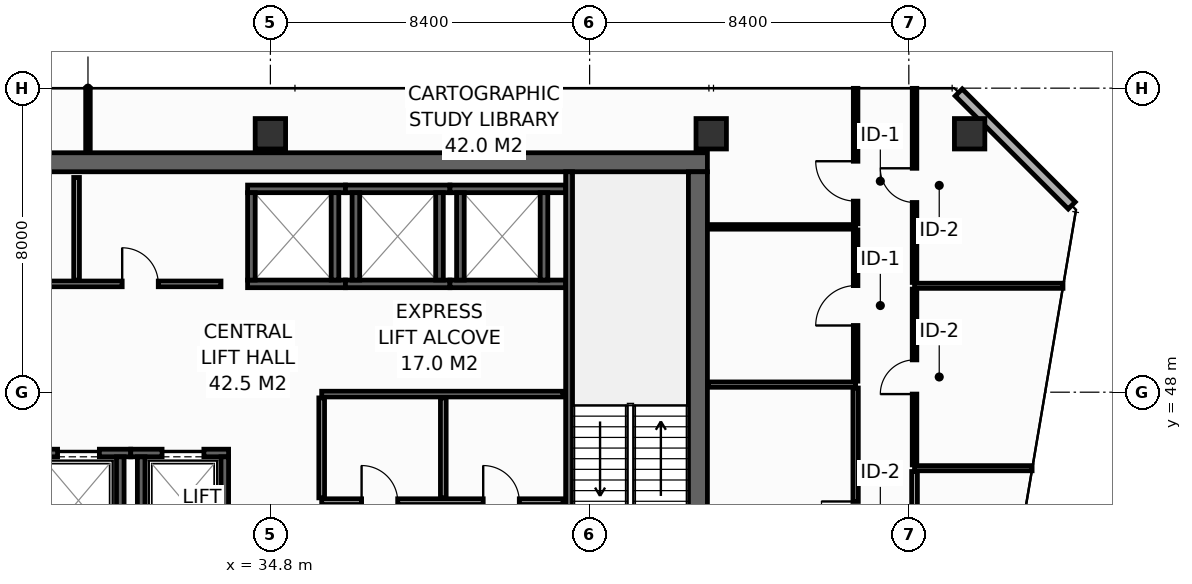
"""IFC4 building model, lengths in metres.
Left out: names, types, materials, properties, quantities, classifications, styles, units other than length and angle.
Written with IfcOpenShell. Run it as: python <this file> out.ifc"""

import sys

from ifc_helpers import new_model, si_unit, direction, frame, frame_2d, origin, origin_2d, place, context, subcontext, project, spatial, rectangle, hollow_rectangle, extrude, element, fill, save


model = new_model("IFC4")
c1 = context("Model", 3, precision=1e-05, world=origin(), true_north=direction((0.0, 1.0)))
c2 = subcontext(c1, "Body", "Model", "MODEL_VIEW")
j1 = project(units=[si_unit("LENGTHUNIT", "METRE"), si_unit("PLANEANGLEUNIT", "RADIAN")], contexts=[c1])
p1 = place(None, origin())
s1 = spatial("IfcSite", under=j1, at=p1, CompositionType="ELEMENT")
p2 = place(p1, origin())
s2 = spatial("IfcBuilding", under=s1, at=p2, CompositionType="ELEMENT")
p3 = place(p2, frame((0.0, 0.0, 198.0)))
s3 = spatial("IfcBuildingStorey", under=s2, at=p3, CompositionType="ELEMENT", Elevation=198.0)
p4 = place(p3, frame((13.6, 54.05, 0.0), z_axis=(0.0, 0.0, 1.0), x_axis=(1.0, 0.0, 0.0)))
e1 = element("IfcWall", 1, at=p4, inside=s3, PredefinedType="SHEAR", context=c2, shape_type="SweptSolid", body=[
    extrude(rectangle(XDim=32.7, YDim=0.5, at=frame_2d((16.35, 0.0))), origin(), (0.0, 0.0, 1.0), 3.55),
])
p5 = place(p3, frame((46.05, 43.4, 0.0), z_axis=(0.0, 0.0, 1.0), x_axis=(0.0, 1.0, 0.0)))
e2 = element("IfcWall", 2, at=p5, inside=s3, PredefinedType="SHEAR", context=c2, shape_type="SweptSolid", body=[
    extrude(rectangle(XDim=10.4, YDim=0.5, at=frame_2d((5.2, 0.0))), origin(), (0.0, 0.0, 1.0), 3.55),
])
for number, where, z_axis, x_axis in (
    (3, (34.8, 54.8, 0.0), (0.0, 0.0, 1.0), (1.0, 0.0, 0.0)),
    (4, (46.4, 54.8, 0.0), (0.0, 0.0, 1.0), (1.0, 0.0, 0.0)),
    (5, (53.2, 54.8, 0.0), (0.0, 0.0, 1.0), (1.0, 0.0, 0.0)),
):
    element("IfcColumn", number, at=place(p3, frame(where, z_axis=z_axis, x_axis=x_axis)), inside=s3, PredefinedType="COLUMN", context=c2, shape_type="SweptSolid", body=[
        extrude(hollow_rectangle(XDim=0.8, YDim=0.8, WallThickness=0.036, at=origin_2d()), origin(), (0.0, 0.0, 1.0), 3.8),
    ])
p6 = place(p3, frame((28.375, 46.4, 0.0), z_axis=(0.0, 0.0, 1.0), x_axis=(1.0, 0.0, 0.0)))
e6 = element("IfcWall", 6, at=p6, inside=s3, PredefinedType="SHEAR", context=c2, shape_type="SweptSolid", body=[
    extrude(rectangle(XDim=2.75, YDim=0.2, at=frame_2d((1.375, 0.0))), origin(), (0.0, 0.0, 1.0), 3.55),
])
p7 = place(p6, frame((0.825, 0.0, 0.0)))
e7 = element("IfcOpeningElement", 7, at=p7, cuts=e6, PredefinedType="OPENING", context=c2, shape_type="SweptSolid", body=[
    extrude(rectangle(XDim=1.1, YDim=2.2, at=frame_2d((0.55, 1.1))), frame((0.0, 0.11, 0.0), z_axis=(0.0, -1.0, 0.0), x_axis=(1.0, 0.0, 0.0)), (0.0, 0.0, 1.0), 0.22),
])
p8 = place(p3, frame((30.85, 44.0, 0.0), z_axis=(0.0, 0.0, 1.0), x_axis=(0.0, 1.0, 0.0)))
e8 = element("IfcWall", 8, at=p8, inside=s3, PredefinedType="SHEAR", context=c2, shape_type="SweptSolid", body=[
    extrude(rectangle(XDim=2.3, YDim=0.2, at=frame_2d((1.15, 0.0))), origin(), (0.0, 0.0, 1.0), 3.55),
])
p9 = place(p3, frame((31.125, 46.4, 0.0), z_axis=(0.0, 0.0, 1.0), x_axis=(1.0, 0.0, 0.0)))
e9 = element("IfcWall", 9, at=p9, inside=s3, PredefinedType="SHEAR", context=c2, shape_type="SweptSolid", body=[
    extrude(rectangle(XDim=2.575, YDim=0.2, at=frame_2d((1.288, 0.0))), origin(), (0.0, 0.0, 1.0), 3.55),
])
p10 = place(p9, frame((0.825, 0.0, 0.0)))
e10 = element("IfcOpeningElement", 10, at=p10, cuts=e9, PredefinedType="OPENING", context=c2, shape_type="SweptSolid", body=[
    extrude(rectangle(XDim=1.1, YDim=2.2, at=frame_2d((0.55, 1.1))), frame((0.0, 0.11, 0.0), z_axis=(0.0, -1.0, 0.0), x_axis=(1.0, 0.0, 0.0)), (0.0, 0.0, 1.0), 0.22),
])
for number, where, z_axis, x_axis in (
    (11, (31.4, 44.0, 0.0), (0.0, 0.0, 1.0), (0.0, 1.0, 0.0)),
    (12, (33.6, 44.0, 0.0), (0.0, 0.0, 1.0), (0.0, 1.0, 0.0)),
):
    element("IfcWall", number, at=place(p3, frame(where, z_axis=z_axis, x_axis=x_axis)), inside=s3, PredefinedType="SHEAR", context=c2, shape_type="SweptSolid", body=[
        extrude(rectangle(XDim=2.3, YDim=0.2, at=frame_2d((1.15, 0.0))), origin(), (0.0, 0.0, 1.0), 3.55),
    ])
for number, where, z_axis, x_axis in (
    (13, (34.2, 50.85, 0.0), (0.0, 0.0, 1.0), (1.0, 0.0, 0.0)),
    (14, (34.2, 53.35, 0.0), (0.0, 0.0, 1.0), (1.0, 0.0, 0.0)),
):
    element("IfcWall", number, at=place(p3, frame(where, z_axis=z_axis, x_axis=x_axis)), inside=s3, PredefinedType="SHEAR", context=c2, shape_type="SweptSolid", body=[
        extrude(rectangle(XDim=2.575, YDim=0.2, at=frame_2d((1.288, 0.0))), origin(), (0.0, 0.0, 1.0), 3.55),
    ])
for number, where, z_axis, x_axis in (
    (15, (34.3, 50.95, 0.0), (0.0, 0.0, 1.0), (0.0, 1.0, 0.0)),
    (16, (36.5, 50.95, 0.0), (0.0, 0.0, 1.0), (0.0, 1.0, 0.0)),
):
    element("IfcWall", number, at=place(p3, frame(where, z_axis=z_axis, x_axis=x_axis)), inside=s3, PredefinedType="SHEAR", context=c2, shape_type="SweptSolid", body=[
        extrude(rectangle(XDim=2.3, YDim=0.2, at=frame_2d((1.15, 0.0))), origin(), (0.0, 0.0, 1.0), 3.55),
    ])
for number, where, z_axis, x_axis in (
    (17, (36.775, 50.85, 0.0), (0.0, 0.0, 1.0), (1.0, 0.0, 0.0)),
    (18, (36.775, 53.35, 0.0), (0.0, 0.0, 1.0), (1.0, 0.0, 0.0)),
):
    element("IfcWall", number, at=place(p3, frame(where, z_axis=z_axis, x_axis=x_axis)), inside=s3, PredefinedType="SHEAR", context=c2, shape_type="SweptSolid", body=[
        extrude(rectangle(XDim=2.75, YDim=0.2, at=frame_2d((1.375, 0.0))), origin(), (0.0, 0.0, 1.0), 3.55),
    ])
for number, where, z_axis, x_axis in (
    (19, (37.05, 50.95, 0.0), (0.0, 0.0, 1.0), (0.0, 1.0, 0.0)),
    (20, (39.25, 50.95, 0.0), (0.0, 0.0, 1.0), (0.0, 1.0, 0.0)),
):
    element("IfcWall", number, at=place(p3, frame(where, z_axis=z_axis, x_axis=x_axis)), inside=s3, PredefinedType="SHEAR", context=c2, shape_type="SweptSolid", body=[
        extrude(rectangle(XDim=2.3, YDim=0.2, at=frame_2d((1.15, 0.0))), origin(), (0.0, 0.0, 1.0), 3.55),
    ])
for number, where, z_axis, x_axis in (
    (21, (39.525, 50.85, 0.0), (0.0, 0.0, 1.0), (1.0, 0.0, 0.0)),
    (22, (39.525, 53.35, 0.0), (0.0, 0.0, 1.0), (1.0, 0.0, 0.0)),
):
    element("IfcWall", number, at=place(p3, frame(where, z_axis=z_axis, x_axis=x_axis)), inside=s3, PredefinedType="SHEAR", context=c2, shape_type="SweptSolid", body=[
        extrude(rectangle(XDim=3.045, YDim=0.2, at=frame_2d((1.522, 0.0))), origin(), (0.0, 0.0, 1.0), 3.55),
    ])
for number, where, z_axis, x_axis in (
    (23, (39.8, 50.95, 0.0), (0.0, 0.0, 1.0), (0.0, 1.0, 0.0)),
    (24, (42.0, 50.95, 0.0), (0.0, 0.0, 1.0), (0.0, 1.0, 0.0)),
):
    element("IfcWall", number, at=place(p3, frame(where, z_axis=z_axis, x_axis=x_axis)), inside=s3, PredefinedType="SHEAR", context=c2, shape_type="SweptSolid", body=[
        extrude(rectangle(XDim=2.3, YDim=0.2, at=frame_2d((1.15, 0.0))), origin(), (0.0, 0.0, 1.0), 3.55),
    ])
p11 = place(p3, frame((42.66, 53.8, 0.0), z_axis=(0.0, 0.0, 1.0), x_axis=(0.0, -1.0, 0.0)))
e25 = element("IfcWall", 25, at=p11, inside=s3, PredefinedType="SHEAR", context=c2, shape_type="SweptSolid", body=[
    extrude(rectangle(XDim=10.4, YDim=0.18, at=frame_2d((5.2, 0.0))), origin(), (0.0, 0.0, 1.0), 3.55),
])
p12 = place(p11, frame((8.99, 0.0, 0.0)))
e26 = element("IfcOpeningElement", 26, at=p12, cuts=e25, PredefinedType="OPENING", context=c2, shape_type="SweptSolid", body=[
    extrude(rectangle(XDim=1.1, YDim=2.15, at=frame_2d((0.55, 1.075))), frame((0.0, 0.1, 0.0), z_axis=(0.0, -1.0, 0.0), x_axis=(1.0, 0.0, 0.0)), (0.0, 0.0, 1.0), 0.2),
])
p13 = place(p3, frame((36.15, 45.12, 0.0), z_axis=(0.0, 0.0, 1.0), x_axis=(1.0, 0.0, 0.0)))
e27 = element("IfcWall", 27, at=p13, inside=s3, PredefinedType="PARTITIONING", context=c2, shape_type="SweptSolid", body=[
    extrude(rectangle(XDim=6.35, YDim=0.15, at=frame_2d((3.175, 0.0))), origin(), (0.0, 0.0, 1.0), 3.55),
])
p14 = place(p13, frame((1.05, 0.0, 0.0)))
e28 = element("IfcOpeningElement", 28, at=p14, cuts=e27, PredefinedType="OPENING", context=c2, shape_type="SweptSolid", body=[
    extrude(rectangle(XDim=0.95, YDim=2.15, at=frame_2d((0.475, 1.075))), frame((0.0, 0.085, 0.0), z_axis=(0.0, -1.0, 0.0), x_axis=(1.0, 0.0, 0.0)), (0.0, 0.0, 1.0), 0.17),
])
p15 = place(p13, frame((4.25, 0.0, 0.0)))
e29 = element("IfcOpeningElement", 29, at=p15, cuts=e27, PredefinedType="OPENING", context=c2, shape_type="SweptSolid", body=[
    extrude(rectangle(XDim=0.95, YDim=2.15, at=frame_2d((0.475, 1.075))), frame((0.0, 0.085, 0.0), z_axis=(0.0, -1.0, 0.0), x_axis=(1.0, 0.0, 0.0)), (0.0, 0.0, 1.0), 0.17),
])
p16 = place(p3, frame((36.15, 47.95, 0.0), z_axis=(0.0, 0.0, 1.0), x_axis=(1.0, 0.0, 0.0)))
e30 = element("IfcWall", 30, at=p16, inside=s3, PredefinedType="PARTITIONING", context=c2, shape_type="SweptSolid", body=[
    extrude(rectangle(XDim=6.35, YDim=0.15, at=frame_2d((3.175, 0.0))), origin(), (0.0, 0.0, 1.0), 3.55),
])
for number, where, z_axis, x_axis in (
    (31, (36.15, 45.22, 0.0), (0.0, 0.0, 1.0), (0.0, 1.0, 0.0)),
    (32, (39.35, 45.22, 0.0), (0.0, 0.0, 1.0), (0.0, 1.0, 0.0)),
):
    element("IfcWall", number, at=place(p3, frame(where, z_axis=z_axis, x_axis=x_axis)), inside=s3, PredefinedType="PARTITIONING", context=c2, shape_type="SweptSolid", body=[
        extrude(rectangle(XDim=2.63, YDim=0.15, at=frame_2d((1.315, 0.0))), origin(), (0.0, 0.0, 1.0), 3.55),
    ])
p17 = place(p3, frame((25.85, 50.85, 0.0), z_axis=(0.0, 0.0, 1.0), x_axis=(1.0, 0.0, 0.0)))
e33 = element("IfcWall", 33, at=p17, inside=s3, PredefinedType="PARTITIONING", context=c2, shape_type="SweptSolid", body=[
    extrude(rectangle(XDim=7.65, YDim=0.15, at=frame_2d((3.825, 0.0))), origin(), (0.0, 0.0, 1.0), 3.55),
])
p18 = place(p17, frame((1.25, 0.0, 0.0)))
e34 = element("IfcOpeningElement", 34, at=p18, cuts=e33, PredefinedType="OPENING", context=c2, shape_type="SweptSolid", body=[
    extrude(rectangle(XDim=0.95, YDim=2.15, at=frame_2d((0.475, 1.075))), frame((0.0, 0.085, 0.0), z_axis=(0.0, -1.0, 0.0), x_axis=(1.0, 0.0, 0.0)), (0.0, 0.0, 1.0), 0.17),
])
p19 = place(p17, frame((5.05, 0.0, 0.0)))
e35 = element("IfcOpeningElement", 35, at=p19, cuts=e33, PredefinedType="OPENING", context=c2, shape_type="SweptSolid", body=[
    extrude(rectangle(XDim=0.95, YDim=2.15, at=frame_2d((0.475, 1.075))), frame((0.0, 0.085, 0.0), z_axis=(0.0, -1.0, 0.0), x_axis=(1.0, 0.0, 0.0)), (0.0, 0.0, 1.0), 0.17),
])
p20 = place(p3, frame((29.7, 50.95, 0.0), z_axis=(0.0, 0.0, 1.0), x_axis=(0.0, 1.0, 0.0)))
e36 = element("IfcWall", 36, at=p20, inside=s3, PredefinedType="PARTITIONING", context=c2, shape_type="SweptSolid", body=[
    extrude(rectangle(XDim=2.7, YDim=0.15, at=frame_2d((1.35, 0.0))), origin(), (0.0, 0.0, 1.0), 3.55),
])
p21 = place(p3, frame((55.887, 52.913, 0.0), z_axis=(0.0, 0.0, 1.0), x_axis=(-0.707106781187, 0.707106781187, 0.0)))
e37 = element("IfcWall", 37, at=p21, inside=s3, PredefinedType="STANDARD", context=c2, shape_type="SweptSolid", body=[
    extrude(rectangle(XDim=4.206, YDim=0.26, at=frame_2d((2.103, 0.0))), origin(), (0.0, 0.0, 1.0), 3.55),
])
p22 = place(p3, frame((46.32, 48.2, 0.0), z_axis=(0.0, 0.0, 1.0), x_axis=(1.0, 0.0, 0.0)))
e38 = element("IfcWall", 38, at=p22, inside=s3, PredefinedType="PARTITIONING", context=c2, shape_type="SweptSolid", body=[
    extrude(rectangle(XDim=3.88, YDim=0.14, at=frame_2d((1.94, 0.0))), origin(), (0.0, 0.0, 1.0), 3.55),
])
p23 = place(p3, frame((50.2, 41.24, 0.0), z_axis=(0.0, 0.0, 1.0), x_axis=(0.0, 1.0, 0.0)))
e39 = element("IfcWall", 39, at=p23, inside=s3, PredefinedType="PARTITIONING", context=c2, shape_type="SweptSolid", body=[
    extrude(rectangle(XDim=6.87, YDim=0.14, at=frame_2d((3.435, 0.0))), origin(), (0.0, 0.0, 1.0), 2.835),
])
p24 = place(p23, frame((2.985, 0.0, 0.0)))
e40 = element("IfcOpeningElement", 40, at=p24, cuts=e39, PredefinedType="OPENING", context=c2, shape_type="SweptSolid", body=[
    extrude(rectangle(XDim=0.9, YDim=2.1, at=frame_2d((0.45, 1.05))), frame((0.0, 0.08, 0.0), z_axis=(0.0, -1.0, 0.0), x_axis=(1.0, 0.0, 0.0)), (0.0, 0.0, 1.0), 0.16),
])
p25 = place(p3, frame((46.32, 52.35, 0.0), z_axis=(0.0, 0.0, 1.0), x_axis=(1.0, 0.0, 0.0)))
e41 = element("IfcWall", 41, at=p25, inside=s3, PredefinedType="PARTITIONING", context=c2, shape_type="SweptSolid", body=[
    extrude(rectangle(XDim=3.88, YDim=0.12, at=frame_2d((1.94, 0.0))), origin(), (0.0, 0.0, 1.0), 3.55),
])
p26 = place(p3, frame((30.0, 54.32, 0.0), z_axis=(0.0, 0.0, 1.0), x_axis=(0.0, 1.0, 0.0)))
e42 = element("IfcWall", 42, at=p26, inside=s3, PredefinedType="PARTITIONING", context=c2, shape_type="SweptSolid", body=[
    extrude(rectangle(XDim=1.675, YDim=0.12, at=frame_2d((0.837, 0.0))), origin(), (0.0, 0.0, 1.0), 2.935),
])
p27 = place(p3, frame((50.2, 48.29, 0.0), z_axis=(0.0, 0.0, 1.0), x_axis=(0.0, 1.0, 0.0)))
e43 = element("IfcWall", 43, at=p27, inside=s3, PredefinedType="PARTITIONING", context=c2, shape_type="SweptSolid", body=[
    extrude(rectangle(XDim=3.98, YDim=0.12, at=frame_2d((1.99, 0.0))), origin(), (0.0, 0.0, 1.0), 3.55),
])
p28 = place(p27, frame((1.465, 0.0, 0.0)))
e44 = element("IfcOpeningElement", 44, at=p28, cuts=e43, PredefinedType="OPENING", context=c2, shape_type="SweptSolid", body=[
    extrude(rectangle(XDim=1.05, YDim=2.15, at=frame_2d((0.525, 1.075))), frame((0.0, 0.07, 0.0), z_axis=(0.0, -1.0, 0.0), x_axis=(1.0, 0.0, 0.0)), (0.0, 0.0, 1.0), 0.14),
])
p29 = place(p3, frame((50.2, 52.43, 0.0), z_axis=(0.0, 0.0, 1.0), x_axis=(0.0, 1.0, 0.0)))
e45 = element("IfcWall", 45, at=p29, inside=s3, PredefinedType="PARTITIONING", context=c2, shape_type="SweptSolid", body=[
    extrude(rectangle(XDim=3.565, YDim=0.12, at=frame_2d((1.783, 0.0))), origin(), (0.0, 0.0, 1.0), 2.935),
])
p30 = place(p29, frame((0.597, 0.0, 0.0)))
e46 = element("IfcOpeningElement", 46, at=p30, cuts=e45, PredefinedType="OPENING", context=c2, shape_type="SweptSolid", body=[
    extrude(rectangle(XDim=1.05, YDim=2.15, at=frame_2d((0.525, 1.075))), frame((0.0, 0.07, 0.0), z_axis=(0.0, -1.0, 0.0), x_axis=(1.0, 0.0, 0.0)), (0.0, 0.0, 1.0), 0.14),
])
p31 = place(p3, frame((51.75, 46.0, 0.0), z_axis=(0.0, 0.0, 1.0), x_axis=(1.0, 0.0, 0.0)))
e47 = element("IfcWall", 47, at=p31, inside=s3, PredefinedType="PARTITIONING", context=c2, shape_type="SweptSolid", body=[
    extrude(rectangle(XDim=3.094, YDim=0.135, at=frame_2d((1.547, 0.0))), origin(), (0.0, 0.0, 1.0), 2.835),
])
p32 = place(p3, frame((51.75, 50.8, 0.0), z_axis=(0.0, 0.0, 1.0), x_axis=(1.0, 0.0, 0.0)))
e48 = element("IfcWall", 48, at=p32, inside=s3, PredefinedType="PARTITIONING", context=c2, shape_type="SweptSolid", body=[
    extrude(rectangle(XDim=3.906, YDim=0.135, at=frame_2d((1.953, 0.0))), origin(), (0.0, 0.0, 1.0), 2.835),
])
p33 = place(p3, frame((51.75, 41.238, 0.0), z_axis=(0.0, 0.0, 1.0), x_axis=(0.0, 1.0, 0.0)))
e49 = element("IfcWall", 49, at=p33, inside=s3, PredefinedType="PARTITIONING", context=c2, shape_type="SweptSolid", body=[
    extrude(rectangle(XDim=4.675, YDim=0.15, at=frame_2d((2.337, 0.0))), origin(), (0.0, 0.0, 1.0), 2.835),
])
p34 = place(p33, frame((1.813, 0.0, 0.0)))
e50 = element("IfcOpeningElement", 50, at=p34, cuts=e49, PredefinedType="OPENING", context=c2, shape_type="SweptSolid", body=[
    extrude(rectangle(XDim=1.05, YDim=2.15, at=frame_2d((0.525, 1.075))), frame((0.0, 0.085, 0.0), z_axis=(0.0, -1.0, 0.0), x_axis=(1.0, 0.0, 0.0)), (0.0, 0.0, 1.0), 0.17),
])
p35 = place(p3, frame((51.75, 46.087, 0.0), z_axis=(0.0, 0.0, 1.0), x_axis=(0.0, 1.0, 0.0)))
e51 = element("IfcWall", 51, at=p35, inside=s3, PredefinedType="PARTITIONING", context=c2, shape_type="SweptSolid", body=[
    extrude(rectangle(XDim=4.625, YDim=0.12, at=frame_2d((2.312, 0.0))), origin(), (0.0, 0.0, 1.0), 3.55),
])
p36 = place(p35, frame((1.863, 0.0, 0.0)))
e52 = element("IfcOpeningElement", 52, at=p36, cuts=e51, PredefinedType="OPENING", context=c2, shape_type="SweptSolid", body=[
    extrude(rectangle(XDim=0.9, YDim=2.1, at=frame_2d((0.45, 1.05))), frame((0.0, 0.07, 0.0), z_axis=(0.0, -1.0, 0.0), x_axis=(1.0, 0.0, 0.0)), (0.0, 0.0, 1.0), 0.14),
])
p37 = place(p3, frame((51.75, 50.887, 0.0), z_axis=(0.0, 0.0, 1.0), x_axis=(0.0, 1.0, 0.0)))
e53 = element("IfcWall", 53, at=p37, inside=s3, PredefinedType="PARTITIONING", context=c2, shape_type="SweptSolid", body=[
    extrude(rectangle(XDim=5.108, YDim=0.12, at=frame_2d((2.554, 0.0))), origin(), (0.0, 0.0, 1.0), 2.935),
])
p38 = place(p37, frame((2.104, 0.0, 0.0)))
e54 = element("IfcOpeningElement", 54, at=p38, cuts=e53, PredefinedType="OPENING", context=c2, shape_type="SweptSolid", body=[
    extrude(rectangle(XDim=0.9, YDim=2.1, at=frame_2d((0.45, 1.05))), frame((0.0, 0.07, 0.0), z_axis=(0.0, -1.0, 0.0), x_axis=(1.0, 0.0, 0.0)), (0.0, 0.0, 1.0), 0.14),
])
p39 = place(p7, origin())
e55 = element("IfcDoor", 55, at=p39, inside=s3, OperationType="SLIDING_TO_LEFT", PredefinedType="DOOR", context=c2, shape_type="SweptSolid", body=[
    extrude(rectangle(XDim=1.1, YDim=2.2, at=frame_2d((0.55, 1.1))), frame((0.0, 0.025, 0.0), z_axis=(0.0, -1.0, 0.0), x_axis=(1.0, 0.0, 0.0)), (0.0, 0.0, 1.0), 0.05),
])
fill(e7, e55)
p40 = place(p10, origin())
e56 = element("IfcDoor", 56, at=p40, inside=s3, OperationType="SLIDING_TO_LEFT", PredefinedType="DOOR", context=c2, shape_type="SweptSolid", body=[
    extrude(rectangle(XDim=1.1, YDim=2.2, at=frame_2d((0.55, 1.1))), frame((0.0, 0.025, 0.0), z_axis=(0.0, -1.0, 0.0), x_axis=(1.0, 0.0, 0.0)), (0.0, 0.0, 1.0), 0.05),
])
fill(e10, e56)
p41 = place(p14, origin())
e57 = element("IfcDoor", 57, at=p41, inside=s3, OperationType="SINGLE_SWING_LEFT", PredefinedType="DOOR", context=c2, shape_type="SweptSolid", body=[
    extrude(rectangle(XDim=0.95, YDim=2.15, at=frame_2d((0.475, 1.075))), frame((0.0, 0.025, 0.0), z_axis=(0.0, -1.0, 0.0), x_axis=(1.0, 0.0, 0.0)), (0.0, 0.0, 1.0), 0.05),
])
fill(e28, e57)
p42 = place(p15, origin())
e58 = element("IfcDoor", 58, at=p42, inside=s3, OperationType="SINGLE_SWING_LEFT", PredefinedType="DOOR", context=c2, shape_type="SweptSolid", body=[
    extrude(rectangle(XDim=0.95, YDim=2.15, at=frame_2d((0.475, 1.075))), frame((0.0, 0.025, 0.0), z_axis=(0.0, -1.0, 0.0), x_axis=(1.0, 0.0, 0.0)), (0.0, 0.0, 1.0), 0.05),
])
fill(e29, e58)
p43 = place(p19, origin())
e59 = element("IfcDoor", 59, at=p43, inside=s3, OperationType="SINGLE_SWING_LEFT", PredefinedType="DOOR", context=c2, shape_type="SweptSolid", body=[
    extrude(rectangle(XDim=0.95, YDim=2.15, at=frame_2d((0.475, 1.075))), frame((0.0, 0.025, 0.0), z_axis=(0.0, -1.0, 0.0), x_axis=(1.0, 0.0, 0.0)), (0.0, 0.0, 1.0), 0.05),
])
fill(e35, e59)
p44 = place(p24, origin())
e60 = element("IfcDoor", 60, at=p44, inside=s3, OperationType="SINGLE_SWING_RIGHT", PredefinedType="DOOR", context=c2, shape_type="SweptSolid", body=[
    extrude(rectangle(XDim=0.9, YDim=2.1, at=frame_2d((0.45, 1.05))), frame((0.0, 0.025, 0.0), z_axis=(0.0, -1.0, 0.0), x_axis=(1.0, 0.0, 0.0)), (0.0, 0.0, 1.0), 0.05),
])
fill(e40, e60)
p45 = place(p28, origin())
e61 = element("IfcDoor", 61, at=p45, inside=s3, OperationType="SINGLE_SWING_LEFT", PredefinedType="DOOR", context=c2, shape_type="SweptSolid", body=[
    extrude(rectangle(XDim=1.05, YDim=2.15, at=frame_2d((0.525, 1.075))), frame((0.0, 0.025, 0.0), z_axis=(0.0, -1.0, 0.0), x_axis=(1.0, 0.0, 0.0)), (0.0, 0.0, 1.0), 0.05),
])
fill(e44, e61)
p46 = place(p30, origin())
e62 = element("IfcDoor", 62, at=p46, inside=s3, OperationType="SINGLE_SWING_RIGHT", PredefinedType="DOOR", context=c2, shape_type="SweptSolid", body=[
    extrude(rectangle(XDim=1.05, YDim=2.15, at=frame_2d((0.525, 1.075))), frame((0.0, 0.025, 0.0), z_axis=(0.0, -1.0, 0.0), x_axis=(1.0, 0.0, 0.0)), (0.0, 0.0, 1.0), 0.05),
])
fill(e46, e62)
p47 = place(p36, origin())
e63 = element("IfcDoor", 63, at=p47, inside=s3, OperationType="SINGLE_SWING_LEFT", PredefinedType="DOOR", context=c2, shape_type="SweptSolid", body=[
    extrude(rectangle(XDim=0.9, YDim=2.1, at=frame_2d((0.45, 1.05))), frame((0.0, 0.025, 0.0), z_axis=(0.0, -1.0, 0.0), x_axis=(1.0, 0.0, 0.0)), (0.0, 0.0, 1.0), 0.05),
])
fill(e52, e63)
p48 = place(p38, origin())
e64 = element("IfcDoor", 64, at=p48, inside=s3, OperationType="SINGLE_SWING_RIGHT", PredefinedType="DOOR", context=c2, shape_type="SweptSolid", body=[
    extrude(rectangle(XDim=0.9, YDim=2.1, at=frame_2d((0.45, 1.05))), frame((0.0, 0.025, 0.0), z_axis=(0.0, -1.0, 0.0), x_axis=(1.0, 0.0, 0.0)), (0.0, 0.0, 1.0), 0.05),
])
fill(e54, e64)
save(model, sys.argv[1])
